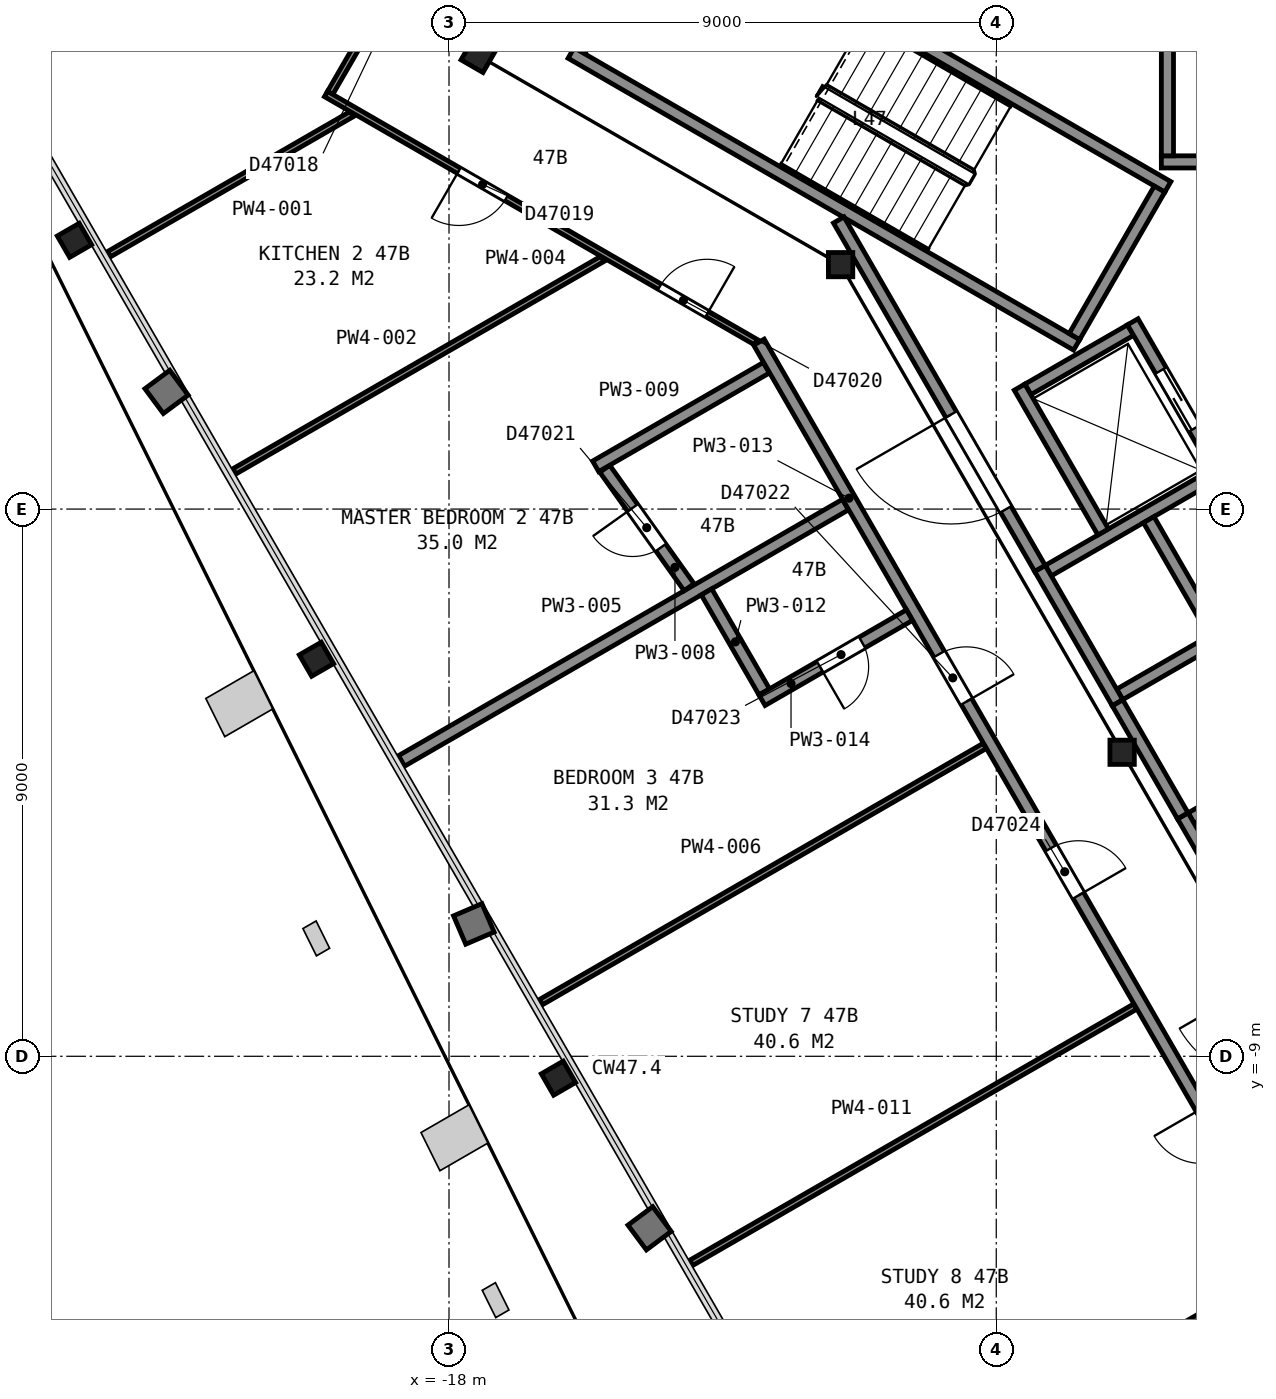
"""IFC4 building model, lengths in metres.
Left out: names, types, materials, properties, quantities, classifications, styles, units other than length and angle.
Written with IfcOpenShell. Run it as: python <this file> out.ifc"""

import sys

from ifc_helpers import new_model, si_unit, direction, frame, frame_2d, origin, origin_2d, place, context, subcontext, project, spatial, rectangle, i_section, extrude, element, fill, save


model = new_model("IFC4")
c1 = context("Model", 3, precision=1e-05, world=origin(), true_north=direction((0.0, 1.0)))
c2 = subcontext(c1, "Body", "Model", "MODEL_VIEW")
j1 = project(units=[si_unit("LENGTHUNIT", "METRE"), si_unit("PLANEANGLEUNIT", "RADIAN")], contexts=[c1])
p1 = place(None, origin())
s1 = spatial("IfcSite", under=j1, at=p1, CompositionType="ELEMENT")
p2 = place(p1, origin())
s2 = spatial("IfcBuilding", under=s1, at=p2, CompositionType="ELEMENT")
p3 = place(p2, frame((0.0, 0.0, 189.5)))
s3 = spatial("IfcBuildingStorey", under=s2, at=p3, CompositionType="ELEMENT", Elevation=189.5)
p4 = place(p3, frame((-24.16, 4.42, 0.04), z_axis=(0.0, 0.0, 1.0), x_axis=(-0.5, 0.866025403784, 0.0)))
e1 = element("IfcColumn", 1, at=p4, inside=s3, PredefinedType="COLUMN", context=c2, shape_type="SweptSolid", body=[
    extrude(i_section(OverallWidth=0.406, OverallDepth=0.417, WebThickness=0.03, FlangeThickness=0.048, FilletRadius=0.015, at=origin_2d()), origin(), (0.0, 0.0, 1.0), 3.66),
])
p5 = place(p3, frame((-20.18, -2.47, 0.035), z_axis=(0.0, 0.0, 1.0), x_axis=(-0.5, 0.866025403784, 0.0)))
e2 = element("IfcColumn", 2, at=p5, inside=s3, PredefinedType="COLUMN", context=c2, shape_type="SweptSolid", body=[
    extrude(i_section(OverallWidth=0.406, OverallDepth=0.417, WebThickness=0.03, FlangeThickness=0.048, FilletRadius=0.015, at=origin_2d()), origin(), (0.0, 0.0, 1.0), 3.665),
])
p6 = place(p3, frame((-16.2, -9.36, 0.03), z_axis=(0.0, 0.0, 1.0), x_axis=(-0.5, 0.866025403784, 0.0)))
e3 = element("IfcColumn", 3, at=p6, inside=s3, PredefinedType="COLUMN", context=c2, shape_type="SweptSolid", body=[
    extrude(i_section(OverallWidth=0.406, OverallDepth=0.417, WebThickness=0.03, FlangeThickness=0.048, FilletRadius=0.015, at=origin_2d()), origin(), (0.0, 0.0, 1.0), 3.67),
])
p7 = place(p3, frame((-17.52, 7.46, 0.0), z_axis=(0.0, 0.0, 1.0), x_axis=(0.5, 0.866025403784, 0.0)))
e4 = element("IfcColumn", 4, at=p7, inside=s3, PredefinedType="COLUMN", context=c2, shape_type="SweptSolid", body=[
    extrude(i_section(OverallWidth=0.406, OverallDepth=0.417, WebThickness=0.03, FlangeThickness=0.048, FilletRadius=0.015, at=origin_2d()), origin(), (0.0, 0.0, 1.0), 3.7),
])
for number, where, z_axis, x_axis in (
    (5, (-11.56, 4.02, 0.0), (0.0, 0.0, 1.0), (1.0, 0.0, 0.0)),
    (6, (-6.93, -4.0, 0.0), (0.0, 0.0, 1.0), (1.0, 0.0, 0.0)),
):
    element("IfcColumn", number, at=place(p3, frame(where, z_axis=z_axis, x_axis=x_axis)), inside=s3, PredefinedType="COLUMN", context=c2, shape_type="SweptSolid", body=[
        extrude(i_section(OverallWidth=0.401, OverallDepth=0.399, WebThickness=0.025, FlangeThickness=0.04, FilletRadius=0.015, at=origin_2d()), origin(), (0.0, 0.0, 1.0), 3.7),
    ])
p8 = place(p3, frame((-14.455, 9.962, 0.0), z_axis=(0.0, 0.0, 1.0), x_axis=(-0.500049511043, -0.865996816683, 0.0)))
e7 = element("IfcWall", 7, at=p8, inside=s3, PredefinedType="PARTITIONING", context=c2, shape_type="SweptSolid", body=[
    extrude(rectangle(XDim=2.8, YDim=0.2, at=frame_2d((1.4, 0.0))), origin(), (0.0, 0.0, 1.0), 3.45),
])
p9 = place(p8, frame((0.85, 0.0, 0.0)))
e8 = element("IfcOpeningElement", 8, at=p9, cuts=e7, PredefinedType="OPENING", context=c2, shape_type="SweptSolid", body=[
    extrude(rectangle(XDim=1.1, YDim=2.1, at=frame_2d((0.55, 1.05))), frame((0.0, 0.11, 0.0), z_axis=(0.0, -1.0, 0.0), x_axis=(1.0, 0.0, 0.0)), (0.0, 0.0, 1.0), 0.22),
])
for number, where, z_axis, x_axis in (
    (9, (-7.678, 2.701, 0.0), (0.0, 0.0, 1.0), (-0.866, 0.5, 0.0)),
    (10, (-6.178, 5.299, 0.0), (0.0, 0.0, 1.0), (-0.866, 0.5, 0.0)),
):
    element("IfcWall", number, at=place(p3, frame(where, z_axis=z_axis, x_axis=x_axis)), inside=s3, PredefinedType="PARTITIONING", context=c2, shape_type="SweptSolid", body=[
        extrude(rectangle(XDim=9.6, YDim=0.2, at=frame_2d((4.8, 0.0))), origin(), (0.0, 0.0, 1.0), 3.45),
    ])
p10 = place(p3, frame((-6.315, 5.262, 0.0), z_axis=(0.0, 0.0, 1.0), x_axis=(-0.500049511043, -0.865996816683, 0.0)))
e11 = element("IfcWall", 11, at=p10, inside=s3, PredefinedType="PARTITIONING", context=c2, shape_type="SweptSolid", body=[
    extrude(rectangle(XDim=2.8, YDim=0.2, at=frame_2d((1.4, 0.0))), origin(), (0.0, 0.0, 1.0), 3.45),
])
p11 = place(p3, frame((-6.285, 5.71, 0.0), z_axis=(0.0, 0.0, 1.0), x_axis=(1.0, 0.0, 0.0)))
e12 = element("IfcWall", 12, at=p11, inside=s3, PredefinedType="PARTITIONING", context=c2, shape_type="SweptSolid", body=[
    extrude(rectangle(XDim=2.35, YDim=0.2, at=frame_2d((1.175, 0.0))), origin(), (0.0, 0.0, 1.0), 3.7),
])
for number, where, z_axis, x_axis in (
    (13, (-5.795, -5.083, 0.0), (0.0, 0.0, 1.0), (0.866, 0.5, 0.0)),
    (14, (-6.97, -3.048, 0.0), (0.0, 0.0, 1.0), (0.866, 0.5, 0.0)),
):
    element("IfcWall", number, at=place(p3, frame(where, z_axis=z_axis, x_axis=x_axis)), inside=s3, PredefinedType="PARTITIONING", context=c2, shape_type="SweptSolid", body=[
        extrude(rectangle(XDim=1.75, YDim=0.2, at=frame_2d((0.875, 0.0))), origin(), (0.0, 0.0, 1.0), 3.7),
    ])
p12 = place(p3, frame((-8.145, -1.013, 0.0), z_axis=(0.0, 0.0, 1.0), x_axis=(0.866016494683, 0.500015430699, 0.0)))
e15 = element("IfcWall", 15, at=p12, inside=s3, PredefinedType="PARTITIONING", context=c2, shape_type="SweptSolid", body=[
    extrude(rectangle(XDim=3.15, YDim=0.2, at=frame_2d((1.575, 0.0))), origin(), (0.0, 0.0, 1.0), 3.7),
])
p13 = place(p3, frame((-8.48, 1.969, 0.0), z_axis=(0.0, 0.0, 1.0), x_axis=(0.866000020948, 0.500043961785, 0.0)))
e16 = element("IfcWall", 16, at=p13, inside=s3, PredefinedType="PARTITIONING", context=c2, shape_type="SweptSolid", body=[
    extrude(rectangle(XDim=1.95, YDim=0.2, at=frame_2d((0.975, 0.0))), origin(), (0.0, 0.0, 1.0), 3.7),
])
p14 = place(p3, frame((-6.185, 5.81, 0.0), z_axis=(0.0, 0.0, 1.0), x_axis=(0.0, 1.0, 0.0)))
e17 = element("IfcWall", 17, at=p14, inside=s3, PredefinedType="PARTITIONING", context=c2, shape_type="SweptSolid", body=[
    extrude(rectangle(XDim=1.75, YDim=0.2, at=frame_2d((0.875, 0.0))), origin(), (0.0, 0.0, 1.0), 3.7),
])
p15 = place(p3, frame((-5.28, 0.525, 0.0), z_axis=(0.0, 0.0, 1.0), x_axis=(-0.500037662692, 0.866003658127, 0.0)))
e18 = element("IfcWall", 18, at=p15, inside=s3, PredefinedType="PARTITIONING", context=c2, shape_type="SweptSolid", body=[
    extrude(rectangle(XDim=2.95, YDim=0.2, at=frame_2d((1.475, 0.0))), origin(), (0.0, 0.0, 1.0), 3.7),
])
p16 = place(p15, frame((0.925, 0.0, 0.0)))
e19 = element("IfcOpeningElement", 19, at=p16, cuts=e18, PredefinedType="OPENING", context=c2, shape_type="SweptSolid", body=[
    extrude(rectangle(XDim=1.1, YDim=2.1, at=frame_2d((0.55, 1.05))), frame((0.0, 0.11, 0.0), z_axis=(0.0, -1.0, 0.0), x_axis=(1.0, 0.0, 0.0)), (0.0, 0.0, 1.0), 0.22),
])
p17 = place(p3, frame((-5.318, -2.21, 0.0), z_axis=(0.0, 0.0, 1.0), x_axis=(-0.499938297808, 0.866061024631, 0.0)))
e20 = element("IfcWall", 20, at=p17, inside=s3, PredefinedType="PARTITIONING", context=c2, shape_type="SweptSolid", body=[
    extrude(rectangle(XDim=2.35, YDim=0.2, at=frame_2d((1.175, 0.0))), origin(), (0.0, 0.0, 1.0), 3.7),
])
p18 = place(p3, frame((-7.242, -0.376, 0.0), z_axis=(0.0, 0.0, 1.0), x_axis=(-0.499996545922, 0.866027397988, 0.0)))
e21 = element("IfcWall", 21, at=p18, inside=s3, PredefinedType="PARTITIONING", context=c2, shape_type="SweptSolid", body=[
    extrude(rectangle(XDim=2.75, YDim=0.2, at=frame_2d((1.375, 0.0))), origin(), (0.0, 0.0, 1.0), 3.7),
])
for number, where, z_axis, x_axis in (
    (22, (-4.656, -7.255, 0.0), (0.0, 0.0, 1.0), (-0.5, 0.866, 0.0)),
    (23, (-7.006, -3.185, 0.0), (0.0, 0.0, 1.0), (-0.5, 0.866, 0.0)),
):
    element("IfcWall", number, at=place(p3, frame(where, z_axis=z_axis, x_axis=x_axis)), inside=s3, PredefinedType="PARTITIONING", context=c2, shape_type="SweptSolid", body=[
        extrude(rectangle(XDim=2.55, YDim=0.2, at=frame_2d((1.275, 0.0))), origin(), (0.0, 0.0, 1.0), 3.7),
    ])
p19 = place(p3, frame((-11.591, 4.755, 0.0), z_axis=(0.0, 0.0, 1.0), x_axis=(0.500043977787, -0.866000011708, 0.0)))
e24 = element("IfcWall", 24, at=p19, inside=s3, PredefinedType="PARTITIONING", context=c2, shape_type="SweptSolid", body=[
    extrude(rectangle(XDim=6.617, YDim=0.2, at=frame_2d((3.308, 0.0))), origin(), (0.0, 0.0, 1.0), 3.45),
])
p20 = place(p19, frame((3.695, 0.0, 0.0)))
e25 = element("IfcOpeningElement", 25, at=p20, cuts=e24, PredefinedType="OPENING", context=c2, shape_type="SweptSolid", body=[
    extrude(rectangle(XDim=1.8, YDim=2.1, at=frame_2d((0.9, 1.05))), frame((0.0, 0.11, 0.0), z_axis=(0.0, -1.0, 0.0), x_axis=(1.0, 0.0, 0.0)), (0.0, 0.0, 1.0), 0.22),
])
p21 = place(p3, frame((-7.005, -3.187, 0.0), z_axis=(0.0, 0.0, 1.0), x_axis=(0.499689606989, -0.866204535123, 0.0)))
e26 = element("IfcWall", 26, at=p21, inside=s3, PredefinedType="PARTITIONING", context=c2, shape_type="SweptSolid", body=[
    extrude(rectangle(XDim=2.145, YDim=0.2, at=frame_2d((1.072, 0.0))), origin(), (0.0, 0.0, 1.0), 3.45),
])
p22 = place(p3, frame((-23.592, 4.192, 0.0), z_axis=(0.0, 0.0, 1.0), x_axis=(0.866056775574, 0.499945658529, 0.0)))
e27 = element("IfcWall", 27, at=p22, inside=s3, PredefinedType="PARTITIONING", context=c2, shape_type="SweptSolid", body=[
    extrude(rectangle(XDim=4.608, YDim=0.1, at=frame_2d((2.304, 0.0))), origin(), (0.0, 0.0, 1.0), 2.713),
])
p23 = place(p3, frame((-21.53, 0.62, 0.0), z_axis=(0.0, 0.0, 1.0), x_axis=(0.865986079307, 0.500068105808, 0.0)))
e28 = element("IfcWall", 28, at=p23, inside=s3, PredefinedType="PARTITIONING", context=c2, shape_type="SweptSolid", body=[
    extrude(rectangle(XDim=6.99, YDim=0.1, at=frame_2d((3.495, 0.0))), origin(), (0.0, 0.0, 1.0), 2.713),
])
p24 = place(p3, frame((-19.955, 6.844, 0.0), z_axis=(0.0, 0.0, 1.0), x_axis=(0.500415732313, 0.865785247537, 0.0)))
e29 = element("IfcWall", 29, at=p24, inside=s3, PredefinedType="PARTITIONING", context=c2, shape_type="SweptSolid", body=[
    extrude(rectangle(XDim=8.097, YDim=0.1, at=frame_2d((4.049, 0.0))), origin(), (0.0, 0.0, 1.0), 2.713),
])
p25 = place(p24, frame((3.45, 0.0, 0.0)))
e30 = element("IfcOpeningElement", 30, at=p25, cuts=e29, PredefinedType="OPENING", context=c2, shape_type="SweptSolid", body=[
    extrude(rectangle(XDim=1.2, YDim=2.1, at=frame_2d((0.6, 1.05))), frame((0.0, 0.06, 0.0), z_axis=(0.0, -1.0, 0.0), x_axis=(1.0, 0.0, 0.0)), (0.0, 0.0, 1.0), 0.12),
])
p26 = place(p3, frame((-12.952, 2.744, 0.0), z_axis=(0.0, 0.0, 1.0), x_axis=(-0.86608949446, 0.499888975259, 0.0)))
e31 = element("IfcWall", 31, at=p26, inside=s3, PredefinedType="PARTITIONING", context=c2, shape_type="SweptSolid", body=[
    extrude(rectangle(XDim=8.165, YDim=0.1, at=frame_2d((4.083, 0.0))), origin(), (0.0, 0.0, 1.0), 2.713),
])
p27 = place(p26, frame((4.741, 0.0, 0.0)))
e32 = element("IfcOpeningElement", 32, at=p27, cuts=e31, PredefinedType="OPENING", context=c2, shape_type="SweptSolid", body=[
    extrude(rectangle(XDim=0.9, YDim=2.1, at=frame_2d((0.45, 1.05))), frame((0.0, 0.06, 0.0), z_axis=(0.0, -1.0, 0.0), x_axis=(1.0, 0.0, 0.0)), (0.0, 0.0, 1.0), 0.12),
])
p28 = place(p26, frame((0.928, 0.0, 0.0)))
e33 = element("IfcOpeningElement", 33, at=p28, cuts=e31, PredefinedType="OPENING", context=c2, shape_type="SweptSolid", body=[
    extrude(rectangle(XDim=0.9, YDim=2.1, at=frame_2d((0.45, 1.05))), frame((0.0, 0.06, 0.0), z_axis=(0.0, -1.0, 0.0), x_axis=(1.0, 0.0, 0.0)), (0.0, 0.0, 1.0), 0.12),
])
p29 = place(p3, frame((-18.78, -4.142, 0.0), z_axis=(0.0, 0.0, 1.0), x_axis=(0.866020616849, 0.500008291124, 0.0)))
e34 = element("IfcWall", 34, at=p29, inside=s3, PredefinedType="PARTITIONING", context=c2, shape_type="SweptSolid", body=[
    extrude(rectangle(XDim=8.428, YDim=0.2, at=frame_2d((4.214, 0.0))), origin(), (0.0, 0.0, 1.0), 2.713),
])
p30 = place(p3, frame((-16.489, -8.11, 0.0), z_axis=(0.0, 0.0, 1.0), x_axis=(0.865995531057, 0.500051737513, 0.0)))
e35 = element("IfcWall", 35, at=p30, inside=s3, PredefinedType="PARTITIONING", context=c2, shape_type="SweptSolid", body=[
    extrude(rectangle(XDim=8.429, YDim=0.1, at=frame_2d((4.214, 0.0))), origin(), (0.0, 0.0, 1.0), 2.713),
])
p31 = place(p3, frame((-15.438, 0.663, 0.0), z_axis=(0.0, 0.0, 1.0), x_axis=(0.579721135961, -0.81481495109, 0.0)))
e36 = element("IfcWall", 36, at=p31, inside=s3, PredefinedType="PARTITIONING", context=c2, shape_type="SweptSolid", body=[
    extrude(rectangle(XDim=2.392, YDim=0.2, at=frame_2d((1.196, 0.0))), origin(), (0.0, 0.0, 1.0), 2.713),
])
p32 = place(p31, frame((0.79, 0.0, 0.0)))
e37 = element("IfcOpeningElement", 37, at=p32, cuts=e36, PredefinedType="OPENING", context=c2, shape_type="SweptSolid", body=[
    extrude(rectangle(XDim=0.8, YDim=2.1, at=frame_2d((0.4, 1.05))), frame((0.0, 0.11, 0.0), z_axis=(0.0, -1.0, 0.0), x_axis=(1.0, 0.0, 0.0)), (0.0, 0.0, 1.0), 0.22),
])
p33 = place(p3, frame((-15.589, 0.703, 0.0), z_axis=(0.0, 0.0, 1.0), x_axis=(0.86594479446, 0.500139593461, 0.0)))
e38 = element("IfcWall", 38, at=p33, inside=s3, PredefinedType="PARTITIONING", context=c2, shape_type="SweptSolid", body=[
    extrude(rectangle(XDim=3.242, YDim=0.2, at=frame_2d((1.621, 0.0))), origin(), (0.0, 0.0, 1.0), 2.713),
])
p34 = place(p3, frame((-14.015, -12.396, 0.0), z_axis=(0.0, 0.0, 1.0), x_axis=(0.866079962101, 0.499905490315, 0.0)))
e39 = element("IfcWall", 39, at=p34, inside=s3, PredefinedType="PARTITIONING", context=c2, shape_type="SweptSolid", body=[
    extrude(rectangle(XDim=8.429, YDim=0.1, at=frame_2d((4.214, 0.0))), origin(), (0.0, 0.0, 1.0), 2.713),
])
p35 = place(p3, frame((-13.765, -1.362, 0.0), z_axis=(0.0, 0.0, 1.0), x_axis=(0.499911523785, -0.866076479525, 0.0)))
e40 = element("IfcWall", 40, at=p35, inside=s3, PredefinedType="PARTITIONING", context=c2, shape_type="SweptSolid", body=[
    extrude(rectangle(XDim=1.9, YDim=0.2, at=frame_2d((0.95, 0.0))), origin(), (0.0, 0.0, 1.0), 2.713),
])
p36 = place(p3, frame((-4.075, -12.545, 0.0), z_axis=(0.0, 0.0, 1.0), x_axis=(-0.499999743747, 0.866025551732, 0.0)))
e41 = element("IfcWall", 41, at=p36, inside=s3, PredefinedType="PARTITIONING", context=c2, shape_type="SweptSolid", body=[
    extrude(rectangle(XDim=17.656, YDim=0.2, at=frame_2d((8.828, 0.0))), origin(), (0.0, 0.0, 1.0), 2.713),
])
p37 = place(p36, frame((10.83, 0.0, 0.0)))
e42 = element("IfcOpeningElement", 42, at=p37, cuts=e41, PredefinedType="OPENING", context=c2, shape_type="SweptSolid", body=[
    extrude(rectangle(XDim=0.9, YDim=2.1, at=frame_2d((0.45, 1.05))), frame((0.0, 0.11, 0.0), z_axis=(0.0, -1.0, 0.0), x_axis=(1.0, 0.0, 0.0)), (0.0, 0.0, 1.0), 0.22),
])
p38 = place(p36, frame((7.148, 0.0, 0.0)))
e43 = element("IfcOpeningElement", 43, at=p38, cuts=e41, PredefinedType="OPENING", context=c2, shape_type="SweptSolid", body=[
    extrude(rectangle(XDim=0.9, YDim=2.1, at=frame_2d((0.45, 1.05))), frame((0.0, 0.11, 0.0), z_axis=(0.0, -1.0, 0.0), x_axis=(1.0, 0.0, 0.0)), (0.0, 0.0, 1.0), 0.22),
])
p39 = place(p36, frame((2.198, 0.0, 0.0)))
e44 = element("IfcOpeningElement", 44, at=p39, cuts=e41, PredefinedType="OPENING", context=c2, shape_type="SweptSolid", body=[
    extrude(rectangle(XDim=0.9, YDim=2.1, at=frame_2d((0.45, 1.05))), frame((0.0, 0.11, 0.0), z_axis=(0.0, -1.0, 0.0), x_axis=(1.0, 0.0, 0.0)), (0.0, 0.0, 1.0), 0.22),
])
p40 = place(p3, frame((-12.852, -3.144, 0.0), z_axis=(0.0, 0.0, 1.0), x_axis=(0.866018616679, 0.500011755427, 0.0)))
e45 = element("IfcWall", 45, at=p40, inside=s3, PredefinedType="PARTITIONING", context=c2, shape_type="SweptSolid", body=[
    extrude(rectangle(XDim=2.8, YDim=0.2, at=frame_2d((1.4, 0.0))), origin(), (0.0, 0.0, 1.0), 2.713),
])
p41 = place(p40, frame((1.1, 0.0, 0.0)))
e46 = element("IfcOpeningElement", 46, at=p41, cuts=e45, PredefinedType="OPENING", context=c2, shape_type="SweptSolid", body=[
    extrude(rectangle(XDim=0.8, YDim=2.1, at=frame_2d((0.4, 1.05))), frame((0.0, 0.11, 0.0), z_axis=(0.0, -1.0, 0.0), x_axis=(1.0, 0.0, 0.0)), (0.0, 0.0, 1.0), 0.22),
])
p42 = place(p3, frame((-11.54, -16.682, 0.0), z_axis=(0.0, 0.0, 1.0), x_axis=(0.866063141794, 0.499934630153, 0.0)))
e47 = element("IfcWall", 47, at=p42, inside=s3, PredefinedType="PARTITIONING", context=c2, shape_type="SweptSolid", body=[
    extrude(rectangle(XDim=8.433, YDim=0.1, at=frame_2d((4.217, 0.0))), origin(), (0.0, 0.0, 1.0), 2.713),
])
p43 = place(p16, origin())
e48 = element("IfcDoor", 48, at=p43, inside=s3, OperationType="SLIDING_TO_LEFT", PredefinedType="DOOR", context=c2, shape_type="SweptSolid", body=[
    extrude(rectangle(XDim=1.1, YDim=2.1, at=frame_2d((0.55, 1.05))), frame((0.0, 0.025, 0.0), z_axis=(0.0, -1.0, 0.0), x_axis=(1.0, 0.0, 0.0)), (0.0, 0.0, 1.0), 0.05),
])
fill(e19, e48)
p44 = place(p20, origin())
e49 = element("IfcDoor", 49, at=p44, inside=s3, OperationType="DOUBLE_DOOR_SINGLE_SWING", PredefinedType="DOOR", context=c2, shape_type="SweptSolid", body=[
    extrude(rectangle(XDim=1.8, YDim=2.1, at=frame_2d((0.9, 1.05))), frame((0.0, 0.025, 0.0), z_axis=(0.0, -1.0, 0.0), x_axis=(1.0, 0.0, 0.0)), (0.0, 0.0, 1.0), 0.05),
])
fill(e25, e49)
p45 = place(p27, origin())
e50 = element("IfcDoor", 50, at=p45, inside=s3, OperationType="SINGLE_SWING_RIGHT", PredefinedType="DOOR", context=c2, shape_type="SweptSolid", body=[
    extrude(rectangle(XDim=0.9, YDim=2.1, at=frame_2d((0.45, 1.05))), frame((0.0, 0.025, 0.0), z_axis=(0.0, -1.0, 0.0), x_axis=(1.0, 0.0, 0.0)), (0.0, 0.0, 1.0), 0.05),
])
fill(e32, e50)
p46 = place(p28, origin())
e51 = element("IfcDoor", 51, at=p46, inside=s3, OperationType="SINGLE_SWING_LEFT", PredefinedType="DOOR", context=c2, shape_type="SweptSolid", body=[
    extrude(rectangle(XDim=0.9, YDim=2.1, at=frame_2d((0.45, 1.05))), frame((0.0, 0.025, 0.0), z_axis=(0.0, -1.0, 0.0), x_axis=(1.0, 0.0, 0.0)), (0.0, 0.0, 1.0), 0.05),
])
fill(e33, e51)
p47 = place(p32, origin())
e52 = element("IfcDoor", 52, at=p47, inside=s3, OperationType="SINGLE_SWING_LEFT", PredefinedType="DOOR", context=c2, shape_type="SweptSolid", body=[
    extrude(rectangle(XDim=0.8, YDim=2.1, at=frame_2d((0.4, 1.05))), frame((0.0, 0.025, 0.0), z_axis=(0.0, -1.0, 0.0), x_axis=(1.0, 0.0, 0.0)), (0.0, 0.0, 1.0), 0.05),
])
fill(e37, e52)
p48 = place(p37, origin())
e53 = element("IfcDoor", 53, at=p48, inside=s3, OperationType="SINGLE_SWING_LEFT", PredefinedType="DOOR", context=c2, shape_type="SweptSolid", body=[
    extrude(rectangle(XDim=0.9, YDim=2.1, at=frame_2d((0.45, 1.05))), frame((0.0, 0.025, 0.0), z_axis=(0.0, -1.0, 0.0), x_axis=(1.0, 0.0, 0.0)), (0.0, 0.0, 1.0), 0.05),
])
fill(e42, e53)
p49 = place(p38, origin())
e54 = element("IfcDoor", 54, at=p49, inside=s3, OperationType="SINGLE_SWING_LEFT", PredefinedType="DOOR", context=c2, shape_type="SweptSolid", body=[
    extrude(rectangle(XDim=0.9, YDim=2.1, at=frame_2d((0.45, 1.05))), frame((0.0, 0.025, 0.0), z_axis=(0.0, -1.0, 0.0), x_axis=(1.0, 0.0, 0.0)), (0.0, 0.0, 1.0), 0.05),
])
fill(e43, e54)
p50 = place(p41, origin())
e55 = element("IfcDoor", 55, at=p50, inside=s3, OperationType="SINGLE_SWING_LEFT", PredefinedType="DOOR", context=c2, shape_type="SweptSolid", body=[
    extrude(rectangle(XDim=0.8, YDim=2.1, at=frame_2d((0.4, 1.05))), frame((0.0, 0.025, 0.0), z_axis=(0.0, -1.0, 0.0), x_axis=(1.0, 0.0, 0.0)), (0.0, 0.0, 1.0), 0.05),
])
fill(e46, e55)
save(model, sys.argv[1])
